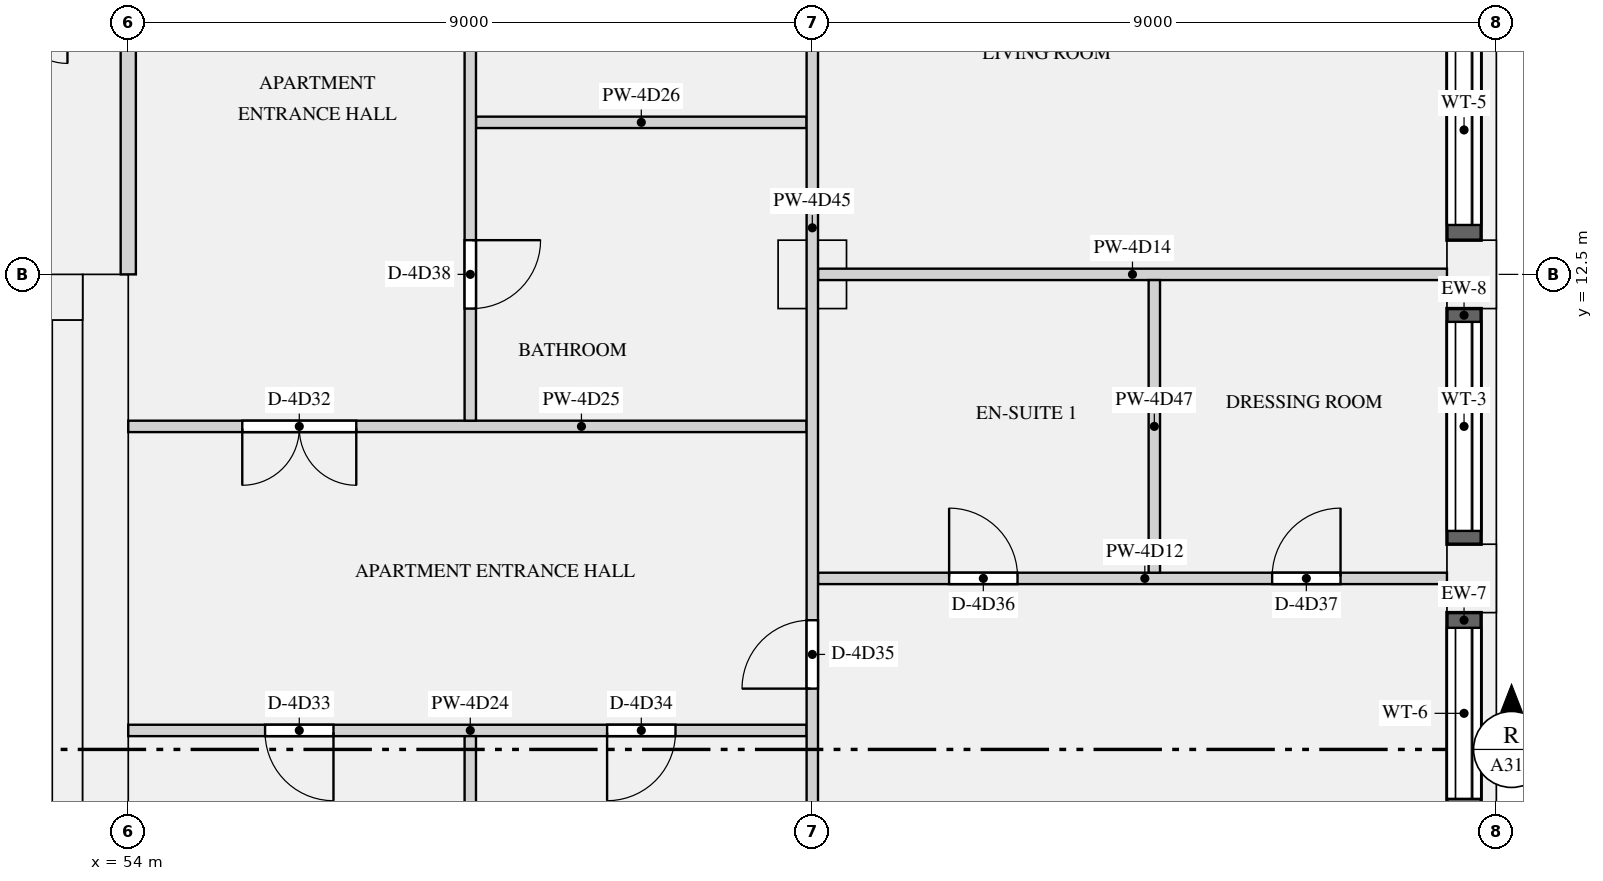
"""IFC4 building model, lengths in metres.
Left out: names, types, materials, properties, quantities, classifications, styles, units other than length and angle.
Written with IfcOpenShell. Run it as: python <this file> out.ifc"""

import sys

from ifc_helpers import new_model, si_unit, direction, frame, frame_2d, origin, origin_2d, place, context, subcontext, project, spatial, rectangle, extrude, element, fill, save


model = new_model("IFC4")
c1 = context("Model", 3, precision=1e-05, world=origin(), true_north=direction((0.0, 1.0)))
c2 = subcontext(c1, "Body", "Model", "MODEL_VIEW")
j1 = project(units=[si_unit("LENGTHUNIT", "METRE"), si_unit("PLANEANGLEUNIT", "RADIAN")], contexts=[c1])
p1 = place(None, origin())
s1 = spatial("IfcSite", under=j1, at=p1, CompositionType="ELEMENT")
p2 = place(p1, origin())
s2 = spatial("IfcBuilding", under=s1, at=p2, CompositionType="ELEMENT")
p3 = place(p2, frame((0.0, 0.0, 223.2)))
s3 = spatial("IfcBuildingStorey", under=s2, at=p3, CompositionType="ELEMENT", Elevation=223.2)
for number, where, z_axis, x_axis in (
    (1, (71.675, 8.5, 0.0), (0.0, 0.0, 1.0), (0.0, 1.0, 0.0)),
    (2, (71.675, 12.5, 0.0), (0.0, 0.0, 1.0), (0.0, 1.0, 0.0)),
):
    element("IfcColumn", number, at=place(p3, frame(where, z_axis=z_axis, x_axis=x_axis)), inside=s3, PredefinedType="USERDEFINED", context=c2, shape_type="SweptSolid", body=[
        extrude(rectangle(XDim=0.9, YDim=0.65, at=origin_2d()), origin(), (0.0, 0.0, 1.0), 3.15),
    ])
p4 = place(p3, frame((63.0, 12.5, 0.0), z_axis=(0.0, 0.0, 1.0), x_axis=(1.0, 0.0, 0.0)))
e3 = element("IfcColumn", 3, at=p4, inside=s3, PredefinedType="COLUMN", context=c2, shape_type="SweptSolid", body=[
    extrude(rectangle(XDim=0.9, YDim=0.9, at=origin_2d()), origin(), (0.0, 0.0, 1.0), 3.15),
])
p5 = place(p3, frame((53.7, 0.0, 0.0), z_axis=(0.0, 0.0, 1.0), x_axis=(0.0, 1.0, 0.0)))
e4 = element("IfcWall", 4, at=p5, inside=s3, PredefinedType="SHEAR", context=c2, shape_type="SweptSolid", body=[
    extrude(rectangle(XDim=12.5, YDim=0.6, at=frame_2d((6.25, 0.0))), origin(), (0.0, 0.0, 1.0), 3.15),
])
p6 = place(p3, frame((18.6, 12.2, 0.0), z_axis=(0.0, 0.0, 1.0), x_axis=(1.0, 0.0, 0.0)))
e5 = element("IfcWall", 5, at=p6, inside=s3, PredefinedType="SHEAR", context=c2, shape_type="SweptSolid", body=[
    extrude(rectangle(XDim=34.8, YDim=0.6, at=frame_2d((17.4, 0.0))), origin(), (0.0, 0.0, 1.0), 3.15),
])
p7 = place(p6, frame((24.575, 0.0, 0.0)))
e6 = element("IfcOpeningElement", 6, at=p7, cuts=e5, PredefinedType="OPENING", context=c2, shape_type="SweptSolid", body=[
    extrude(rectangle(XDim=1.1, YDim=2.1, at=frame_2d((0.55, 1.05))), frame((0.0, 0.31, 0.0), z_axis=(0.0, -1.0, 0.0), x_axis=(1.0, 0.0, 0.0)), (0.0, 0.0, 1.0), 0.62),
])
p8 = place(p6, frame((26.825, 0.0, 0.0)))
e7 = element("IfcOpeningElement", 7, at=p8, cuts=e5, PredefinedType="OPENING", context=c2, shape_type="SweptSolid", body=[
    extrude(rectangle(XDim=1.1, YDim=2.1, at=frame_2d((0.55, 1.05))), frame((0.0, 0.31, 0.0), z_axis=(0.0, -1.0, 0.0), x_axis=(1.0, 0.0, 0.0)), (0.0, 0.0, 1.0), 0.62),
])
p9 = place(p6, frame((29.075, 0.0, 0.0)))
e8 = element("IfcOpeningElement", 8, at=p9, cuts=e5, PredefinedType="OPENING", context=c2, shape_type="SweptSolid", body=[
    extrude(rectangle(XDim=1.1, YDim=2.1, at=frame_2d((0.55, 1.05))), frame((0.0, 0.31, 0.0), z_axis=(0.0, -1.0, 0.0), x_axis=(1.0, 0.0, 0.0)), (0.0, 0.0, 1.0), 0.62),
])
p10 = place(p6, frame((11.95, 0.0, 0.0)))
e9 = element("IfcOpeningElement", 9, at=p10, cuts=e5, PredefinedType="OPENING", context=c2, shape_type="SweptSolid", body=[
    extrude(rectangle(XDim=0.9, YDim=2.1, at=frame_2d((0.45, 1.05))), frame((0.0, 0.31, 0.0), z_axis=(0.0, -1.0, 0.0), x_axis=(1.0, 0.0, 0.0)), (0.0, 0.0, 1.0), 0.62),
])
p11 = place(p6, frame((18.45, 0.0, 0.0)))
e10 = element("IfcOpeningElement", 10, at=p11, cuts=e5, PredefinedType="OPENING", context=c2, shape_type="SweptSolid", body=[
    extrude(rectangle(XDim=0.9, YDim=2.1, at=frame_2d((0.45, 1.05))), frame((0.0, 0.31, 0.0), z_axis=(0.0, -1.0, 0.0), x_axis=(1.0, 0.0, 0.0)), (0.0, 0.0, 1.0), 0.62),
])
p12 = place(p6, frame((1.55, 0.0, 0.0)))
e11 = element("IfcOpeningElement", 11, at=p12, cuts=e5, PredefinedType="OPENING", context=c2, shape_type="SweptSolid", body=[
    extrude(rectangle(XDim=1.2, YDim=2.1, at=frame_2d((0.6, 1.05))), frame((0.0, 0.31, 0.0), z_axis=(0.0, -1.0, 0.0), x_axis=(1.0, 0.0, 0.0)), (0.0, 0.0, 1.0), 0.62),
])
p13 = place(p6, frame((32.05, 0.0, 0.0)))
e12 = element("IfcOpeningElement", 12, at=p13, cuts=e5, PredefinedType="OPENING", context=c2, shape_type="SweptSolid", body=[
    extrude(rectangle(XDim=1.2, YDim=2.1, at=frame_2d((0.6, 1.05))), frame((0.0, 0.31, 0.0), z_axis=(0.0, -1.0, 0.0), x_axis=(1.0, 0.0, 0.0)), (0.0, 0.0, 1.0), 0.62),
])
p14 = place(p3, frame((53.2, 1.0, 0.0), z_axis=(0.0, 0.0, 1.0), x_axis=(0.0, 1.0, 0.0)))
e13 = element("IfcWall", 13, at=p14, inside=s3, PredefinedType="SHEAR", context=c2, shape_type="SweptSolid", body=[
    extrude(rectangle(XDim=10.9, YDim=0.4, at=frame_2d((5.45, 0.0))), origin(), (0.0, 0.0, 1.0), 3.15),
])
p15 = place(p3, frame((71.575, 5.4, 0.9), z_axis=(0.0, 0.0, 1.0), x_axis=(0.0, 1.0, 0.0)))
e14 = element("IfcWall", 14, at=p15, inside=s3, PredefinedType="SOLIDWALL", context=c2, shape_type="SweptSolid", body=[
    extrude(rectangle(XDim=2.65, YDim=0.45, at=frame_2d((1.325, 0.0))), origin(), (0.0, 0.0, 1.0), 1.93),
])
p16 = place(p15, frame((0.2, 0.0, 0.15)))
e15 = element("IfcOpeningElement", 15, at=p16, cuts=e14, PredefinedType="OPENING", context=c2, shape_type="SweptSolid", body=[
    extrude(rectangle(XDim=2.25, YDim=1.5, at=frame_2d((1.125, 0.75))), frame((0.0, 0.235, 0.0), z_axis=(0.0, -1.0, 0.0), x_axis=(1.0, 0.0, 0.0)), (0.0, 0.0, 1.0), 0.47),
])
p17 = place(p3, frame((71.575, 8.95, 0.9), z_axis=(0.0, 0.0, 1.0), x_axis=(0.0, 1.0, 0.0)))
e16 = element("IfcWall", 16, at=p17, inside=s3, PredefinedType="SOLIDWALL", context=c2, shape_type="SweptSolid", body=[
    extrude(rectangle(XDim=3.1, YDim=0.45, at=frame_2d((1.55, 0.0))), origin(), (0.0, 0.0, 1.0), 1.93),
])
p18 = place(p17, frame((0.175, 0.0, 0.15)))
e17 = element("IfcOpeningElement", 17, at=p18, cuts=e16, PredefinedType="OPENING", context=c2, shape_type="SweptSolid", body=[
    extrude(rectangle(XDim=2.75, YDim=1.5, at=frame_2d((1.375, 0.75))), frame((0.0, 0.235, 0.0), z_axis=(0.0, -1.0, 0.0), x_axis=(1.0, 0.0, 0.0)), (0.0, 0.0, 1.0), 0.47),
])
p19 = place(p3, frame((71.575, 12.95, 0.9), z_axis=(0.0, 0.0, 1.0), x_axis=(0.0, 1.0, 0.0)))
e18 = element("IfcWall", 18, at=p19, inside=s3, PredefinedType="SOLIDWALL", context=c2, shape_type="SweptSolid", body=[
    extrude(rectangle(XDim=2.9, YDim=0.45, at=frame_2d((1.45, 0.0))), origin(), (0.0, 0.0, 1.0), 1.93),
])
p20 = place(p19, frame((0.2, 0.0, 0.15)))
e19 = element("IfcOpeningElement", 19, at=p20, cuts=e18, PredefinedType="OPENING", context=c2, shape_type="SweptSolid", body=[
    extrude(rectangle(XDim=2.5, YDim=1.5, at=frame_2d((1.25, 0.75))), frame((0.0, 0.235, 0.0), z_axis=(0.0, -1.0, 0.0), x_axis=(1.0, 0.0, 0.0)), (0.0, 0.0, 1.0), 0.47),
])
p21 = place(p3, frame((54.0, 12.5, 0.0), z_axis=(0.0, 0.0, 1.0), x_axis=(0.0, 1.0, 0.0)))
e20 = element("IfcWall", 20, at=p21, inside=s3, PredefinedType="PARTITIONING", context=c2, shape_type="SweptSolid", body=[
    extrude(rectangle(XDim=3.4, YDim=0.2, at=frame_2d((1.7, 0.0))), origin(), (0.0, 0.0, 1.0), 2.83),
])
p22 = place(p3, frame((63.075, 8.5, 0.0), z_axis=(0.0, 0.0, 1.0), x_axis=(1.0, 0.0, 0.0)))
e21 = element("IfcWall", 21, at=p22, inside=s3, PredefinedType="PARTITIONING", context=c2, shape_type="SweptSolid", body=[
    extrude(rectangle(XDim=8.275, YDim=0.15, at=frame_2d((4.138, 0.0))), origin(), (0.0, 0.0, 1.0), 2.83),
])
p23 = place(p22, frame((1.725, 0.0, 0.0)))
e22 = element("IfcOpeningElement", 22, at=p23, cuts=e21, PredefinedType="OPENING", context=c2, shape_type="SweptSolid", body=[
    extrude(rectangle(XDim=0.9, YDim=2.1, at=frame_2d((0.45, 1.05))), frame((0.0, 0.085, 0.0), z_axis=(0.0, -1.0, 0.0), x_axis=(1.0, 0.0, 0.0)), (0.0, 0.0, 1.0), 0.17),
])
p24 = place(p22, frame((5.975, 0.0, 0.0)))
e23 = element("IfcOpeningElement", 23, at=p24, cuts=e21, PredefinedType="OPENING", context=c2, shape_type="SweptSolid", body=[
    extrude(rectangle(XDim=0.9, YDim=2.1, at=frame_2d((0.45, 1.05))), frame((0.0, 0.085, 0.0), z_axis=(0.0, -1.0, 0.0), x_axis=(1.0, 0.0, 0.0)), (0.0, 0.0, 1.0), 0.17),
])
p25 = place(p3, frame((63.075, 12.5, 0.0), z_axis=(0.0, 0.0, 1.0), x_axis=(1.0, 0.0, 0.0)))
e24 = element("IfcWall", 24, at=p25, inside=s3, PredefinedType="PARTITIONING", context=c2, shape_type="SweptSolid", body=[
    extrude(rectangle(XDim=8.275, YDim=0.15, at=frame_2d((4.138, 0.0))), origin(), (0.0, 0.0, 1.0), 2.83),
])
p26 = place(p3, frame((54.0, 6.5, 0.0), z_axis=(0.0, 0.0, 1.0), x_axis=(1.0, 0.0, 0.0)))
e25 = element("IfcWall", 25, at=p26, inside=s3, PredefinedType="PARTITIONING", context=c2, shape_type="SweptSolid", body=[
    extrude(rectangle(XDim=8.925, YDim=0.15, at=frame_2d((4.462, 0.0))), origin(), (0.0, 0.0, 1.0), 2.83),
])
p27 = place(p26, frame((1.8, 0.0, 0.0)))
e26 = element("IfcOpeningElement", 26, at=p27, cuts=e25, PredefinedType="OPENING", context=c2, shape_type="SweptSolid", body=[
    extrude(rectangle(XDim=0.9, YDim=2.1, at=frame_2d((0.45, 1.05))), frame((0.0, 0.085, 0.0), z_axis=(0.0, -1.0, 0.0), x_axis=(1.0, 0.0, 0.0)), (0.0, 0.0, 1.0), 0.17),
])
p28 = place(p26, frame((6.3, 0.0, 0.0)))
e27 = element("IfcOpeningElement", 27, at=p28, cuts=e25, PredefinedType="OPENING", context=c2, shape_type="SweptSolid", body=[
    extrude(rectangle(XDim=0.9, YDim=2.1, at=frame_2d((0.45, 1.05))), frame((0.0, 0.085, 0.0), z_axis=(0.0, -1.0, 0.0), x_axis=(1.0, 0.0, 0.0)), (0.0, 0.0, 1.0), 0.17),
])
p29 = place(p3, frame((54.0, 10.5, 0.0), z_axis=(0.0, 0.0, 1.0), x_axis=(1.0, 0.0, 0.0)))
e28 = element("IfcWall", 28, at=p29, inside=s3, PredefinedType="PARTITIONING", context=c2, shape_type="SweptSolid", body=[
    extrude(rectangle(XDim=8.925, YDim=0.15, at=frame_2d((4.462, 0.0))), origin(), (0.0, 0.0, 1.0), 2.83),
])
p30 = place(p29, frame((1.5, 0.0, 0.0)))
e29 = element("IfcOpeningElement", 29, at=p30, cuts=e28, PredefinedType="OPENING", context=c2, shape_type="SweptSolid", body=[
    extrude(rectangle(XDim=1.5, YDim=2.1, at=frame_2d((0.75, 1.05))), frame((0.0, 0.085, 0.0), z_axis=(0.0, -1.0, 0.0), x_axis=(1.0, 0.0, 0.0)), (0.0, 0.0, 1.0), 0.17),
])
p31 = place(p3, frame((58.575, 14.5, 0.0), z_axis=(0.0, 0.0, 1.0), x_axis=(1.0, 0.0, 0.0)))
e30 = element("IfcWall", 30, at=p31, inside=s3, PredefinedType="PARTITIONING", context=c2, shape_type="SweptSolid", body=[
    extrude(rectangle(XDim=4.35, YDim=0.15, at=frame_2d((2.175, 0.0))), origin(), (0.0, 0.0, 1.0), 2.83),
])
p32 = place(p3, frame((63.0, 0.65, 0.0), z_axis=(0.0, 0.0, 1.0), x_axis=(0.0, 1.0, 0.0)))
e31 = element("IfcWall", 31, at=p32, inside=s3, PredefinedType="PARTITIONING", context=c2, shape_type="SweptSolid", body=[
    extrude(rectangle(XDim=23.75, YDim=0.15, at=frame_2d((11.875, 0.0))), origin(), (0.0, 0.0, 1.0), 2.83),
])
p33 = place(p32, frame((6.4, 0.0, 0.0)))
e32 = element("IfcOpeningElement", 32, at=p33, cuts=e31, PredefinedType="OPENING", context=c2, shape_type="SweptSolid", body=[
    extrude(rectangle(XDim=0.9, YDim=2.1, at=frame_2d((0.45, 1.05))), frame((0.0, 0.085, 0.0), z_axis=(0.0, -1.0, 0.0), x_axis=(1.0, 0.0, 0.0)), (0.0, 0.0, 1.0), 0.17),
])
p34 = place(p32, frame((17.625, 0.0, 0.0)))
e33 = element("IfcOpeningElement", 33, at=p34, cuts=e31, PredefinedType="OPENING", context=c2, shape_type="SweptSolid", body=[
    extrude(rectangle(XDim=1.5, YDim=2.1, at=frame_2d((0.75, 1.05))), frame((0.0, 0.085, 0.0), z_axis=(0.0, -1.0, 0.0), x_axis=(1.0, 0.0, 0.0)), (0.0, 0.0, 1.0), 0.17),
])
p35 = place(p3, frame((67.5, 8.575, 0.0), z_axis=(0.0, 0.0, 1.0), x_axis=(0.0, 1.0, 0.0)))
e34 = element("IfcWall", 34, at=p35, inside=s3, PredefinedType="PARTITIONING", context=c2, shape_type="SweptSolid", body=[
    extrude(rectangle(XDim=3.85, YDim=0.15, at=frame_2d((1.925, 0.0))), origin(), (0.0, 0.0, 1.0), 2.83),
])
p36 = place(p3, frame((58.5, 0.65, 0.0), z_axis=(0.0, 0.0, 1.0), x_axis=(0.0, 1.0, 0.0)))
e35 = element("IfcWall", 35, at=p36, inside=s3, PredefinedType="PARTITIONING", context=c2, shape_type="SweptSolid", body=[
    extrude(rectangle(XDim=5.775, YDim=0.15, at=frame_2d((2.888, 0.0))), origin(), (0.0, 0.0, 1.0), 2.83),
])
p37 = place(p3, frame((58.5, 10.575, 0.0), z_axis=(0.0, 0.0, 1.0), x_axis=(0.0, 1.0, 0.0)))
e36 = element("IfcWall", 36, at=p37, inside=s3, PredefinedType="PARTITIONING", context=c2, shape_type="SweptSolid", body=[
    extrude(rectangle(XDim=12.325, YDim=0.15, at=frame_2d((6.163, 0.0))), origin(), (0.0, 0.0, 1.0), 2.83),
])
p38 = place(p37, frame((1.475, 0.0, 0.0)))
e37 = element("IfcOpeningElement", 37, at=p38, cuts=e36, PredefinedType="OPENING", context=c2, shape_type="SweptSolid", body=[
    extrude(rectangle(XDim=0.9, YDim=2.1, at=frame_2d((0.45, 1.05))), frame((0.0, 0.085, 0.0), z_axis=(0.0, -1.0, 0.0), x_axis=(1.0, 0.0, 0.0)), (0.0, 0.0, 1.0), 0.17),
])
p39 = place(p37, frame((7.75, 0.0, 0.0)))
e38 = element("IfcOpeningElement", 38, at=p39, cuts=e36, PredefinedType="OPENING", context=c2, shape_type="SweptSolid", body=[
    extrude(rectangle(XDim=0.9, YDim=2.1, at=frame_2d((0.45, 1.05))), frame((0.0, 0.085, 0.0), z_axis=(0.0, -1.0, 0.0), x_axis=(1.0, 0.0, 0.0)), (0.0, 0.0, 1.0), 0.17),
])
p40 = place(p16, origin())
e39 = element("IfcWindow", 39, at=p40, inside=s3, PartitioningType="SINGLE_PANEL", PredefinedType="WINDOW", context=c2, shape_type="SweptSolid", body=[
    extrude(rectangle(XDim=2.25, YDim=1.5, at=frame_2d((1.125, 0.75))), frame((0.0, -0.065, 0.0), z_axis=(0.0, -1.0, 0.0), x_axis=(1.0, 0.0, 0.0)), (0.0, 0.0, 1.0), 0.06),
])
fill(e15, e39)
p41 = place(p18, origin())
e40 = element("IfcWindow", 40, at=p41, inside=s3, PartitioningType="SINGLE_PANEL", PredefinedType="WINDOW", context=c2, shape_type="SweptSolid", body=[
    extrude(rectangle(XDim=2.75, YDim=1.5, at=frame_2d((1.375, 0.75))), frame((0.0, -0.065, 0.0), z_axis=(0.0, -1.0, 0.0), x_axis=(1.0, 0.0, 0.0)), (0.0, 0.0, 1.0), 0.06),
])
fill(e17, e40)
p42 = place(p20, origin())
e41 = element("IfcWindow", 41, at=p42, inside=s3, PartitioningType="SINGLE_PANEL", PredefinedType="WINDOW", context=c2, shape_type="SweptSolid", body=[
    extrude(rectangle(XDim=2.5, YDim=1.5, at=frame_2d((1.25, 0.75))), frame((0.0, -0.065, 0.0), z_axis=(0.0, -1.0, 0.0), x_axis=(1.0, 0.0, 0.0)), (0.0, 0.0, 1.0), 0.06),
])
fill(e19, e41)
p43 = place(p30, frame((1.5, 0.0, 0.0), z_axis=(0.0, 0.0, 1.0), x_axis=(-1.0, 0.0, 0.0)))
e42 = element("IfcDoor", 42, at=p43, inside=s3, OperationType="DOUBLE_DOOR_SINGLE_SWING", PredefinedType="DOOR", context=c2, shape_type="SweptSolid", body=[
    extrude(rectangle(XDim=1.5, YDim=2.1, at=frame_2d((0.75, 1.05))), frame((0.0, 0.025, 0.0), z_axis=(0.0, -1.0, 0.0), x_axis=(1.0, 0.0, 0.0)), (0.0, 0.0, 1.0), 0.05),
])
fill(e29, e42)
p44 = place(p27, frame((0.9, 0.0, 0.0), z_axis=(0.0, 0.0, 1.0), x_axis=(-1.0, 0.0, 0.0)))
e43 = element("IfcDoor", 43, at=p44, inside=s3, OperationType="SINGLE_SWING_LEFT", PredefinedType="DOOR", context=c2, shape_type="SweptSolid", body=[
    extrude(rectangle(XDim=0.9, YDim=2.1, at=frame_2d((0.45, 1.05))), frame((0.0, 0.025, 0.0), z_axis=(0.0, -1.0, 0.0), x_axis=(1.0, 0.0, 0.0)), (0.0, 0.0, 1.0), 0.05),
])
fill(e26, e43)
p45 = place(p28, frame((0.9, 0.0, 0.0), z_axis=(0.0, 0.0, 1.0), x_axis=(-1.0, 0.0, 0.0)))
e44 = element("IfcDoor", 44, at=p45, inside=s3, OperationType="SINGLE_SWING_RIGHT", PredefinedType="DOOR", context=c2, shape_type="SweptSolid", body=[
    extrude(rectangle(XDim=0.9, YDim=2.1, at=frame_2d((0.45, 1.05))), frame((0.0, 0.025, 0.0), z_axis=(0.0, -1.0, 0.0), x_axis=(1.0, 0.0, 0.0)), (0.0, 0.0, 1.0), 0.05),
])
fill(e27, e44)
p46 = place(p33, origin())
e45 = element("IfcDoor", 45, at=p46, inside=s3, OperationType="SINGLE_SWING_LEFT", PredefinedType="DOOR", context=c2, shape_type="SweptSolid", body=[
    extrude(rectangle(XDim=0.9, YDim=2.1, at=frame_2d((0.45, 1.05))), frame((0.0, 0.025, 0.0), z_axis=(0.0, -1.0, 0.0), x_axis=(1.0, 0.0, 0.0)), (0.0, 0.0, 1.0), 0.05),
])
fill(e32, e45)
p47 = place(p23, origin())
e46 = element("IfcDoor", 46, at=p47, inside=s3, OperationType="SINGLE_SWING_LEFT", PredefinedType="DOOR", context=c2, shape_type="SweptSolid", body=[
    extrude(rectangle(XDim=0.9, YDim=2.1, at=frame_2d((0.45, 1.05))), frame((0.0, 0.025, 0.0), z_axis=(0.0, -1.0, 0.0), x_axis=(1.0, 0.0, 0.0)), (0.0, 0.0, 1.0), 0.05),
])
fill(e22, e46)
p48 = place(p24, origin())
e47 = element("IfcDoor", 47, at=p48, inside=s3, OperationType="SINGLE_SWING_RIGHT", PredefinedType="DOOR", context=c2, shape_type="SweptSolid", body=[
    extrude(rectangle(XDim=0.9, YDim=2.1, at=frame_2d((0.45, 1.05))), frame((0.0, 0.025, 0.0), z_axis=(0.0, -1.0, 0.0), x_axis=(1.0, 0.0, 0.0)), (0.0, 0.0, 1.0), 0.05),
])
fill(e23, e47)
p49 = place(p38, frame((0.9, 0.0, 0.0), z_axis=(0.0, 0.0, 1.0), x_axis=(-1.0, 0.0, 0.0)))
e48 = element("IfcDoor", 48, at=p49, inside=s3, OperationType="SINGLE_SWING_LEFT", PredefinedType="DOOR", context=c2, shape_type="SweptSolid", body=[
    extrude(rectangle(XDim=0.9, YDim=2.1, at=frame_2d((0.45, 1.05))), frame((0.0, 0.025, 0.0), z_axis=(0.0, -1.0, 0.0), x_axis=(1.0, 0.0, 0.0)), (0.0, 0.0, 1.0), 0.05),
])
fill(e37, e48)
save(model, sys.argv[1])
